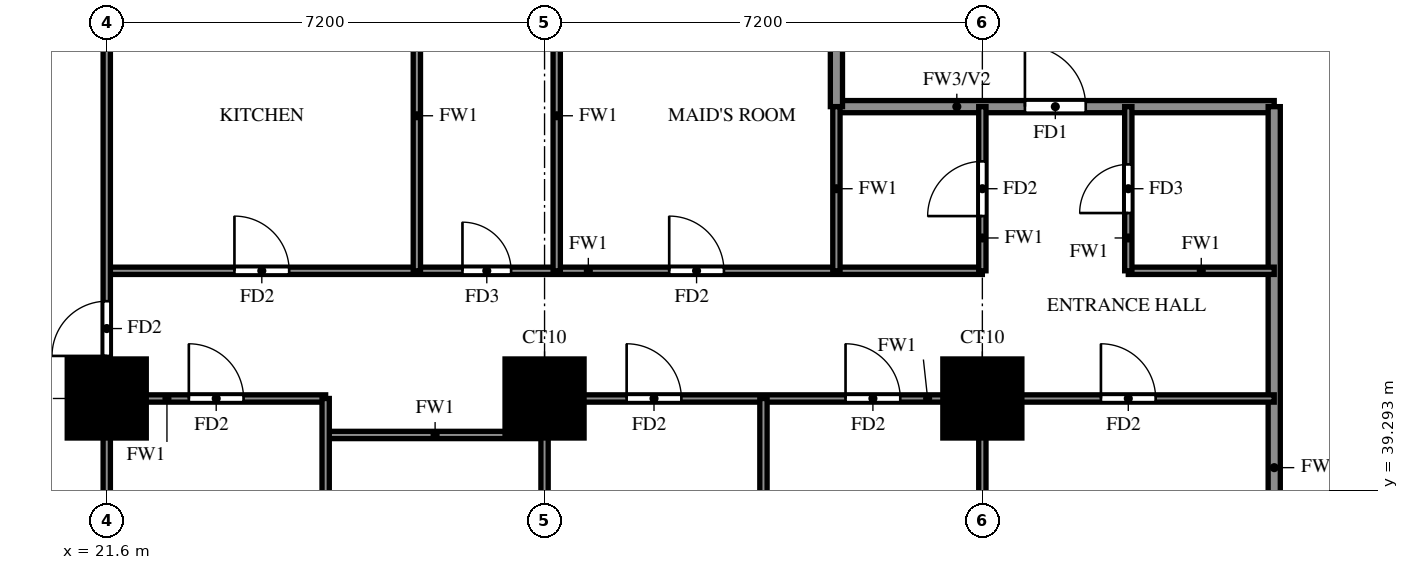
"""IFC4 building model, lengths in metres.
Left out: names, types, materials, properties, quantities, classifications, styles, units other than length and angle.
Written with IfcOpenShell. Run it as: python <this file> out.ifc"""

import sys

from ifc_helpers import new_model, si_unit, direction, frame, frame_2d, origin, origin_2d, place, context, subcontext, project, spatial, rectangle, extrude, source, transform, mapped, element, fill, save


model = new_model("IFC4")
c1 = context("Model", 3, precision=1e-05, world=origin(), true_north=direction((0.0, 1.0)))
c2 = subcontext(c1, "Body", "Model", "MODEL_VIEW")
j1 = project(units=[si_unit("LENGTHUNIT", "METRE"), si_unit("PLANEANGLEUNIT", "RADIAN")], contexts=[c1])
p1 = place(None, origin())
s1 = spatial("IfcSite", under=j1, at=p1, CompositionType="ELEMENT")
p2 = place(p1, origin())
s2 = spatial("IfcBuilding", under=s1, at=p2, CompositionType="ELEMENT")
p3 = place(p2, frame((0.0, 0.0, 90.0)))
s3 = spatial("IfcBuildingStorey", under=s2, at=p3, CompositionType="ELEMENT", Elevation=90.0)
m1 = source(origin(), c2, "Body", "SweptSolid", [
    extrude(rectangle(XDim=1.3, YDim=1.3, at=origin_2d()), origin(), (0.0, 0.0, 1.0), 3.18),
])
for number, where, z_axis, x_axis in (
    (1, (21.6, 40.8, 0.0), (0.0, 0.0, 1.0), (1.0, 0.0, 0.0)),
    (2, (28.8, 40.8, 0.0), (0.0, 0.0, 1.0), (1.0, 0.0, 0.0)),
    (3, (36.0, 40.8, 0.0), (0.0, 0.0, 1.0), (1.0, 0.0, 0.0)),
):
    element("IfcColumn", number, at=place(p3, frame(where, z_axis=z_axis, x_axis=x_axis)), inside=s3, PredefinedType="COLUMN", context=c2, shape_type="MappedRepresentation", body=[
        mapped(m1, transform((0.0, 0.0, 0.0))),
    ])
p4 = place(p3, frame((33.6, 45.6, 0.0), z_axis=(0.0, 0.0, 1.0), x_axis=(1.0, 0.0, 0.0)))
e4 = element("IfcWall", 4, at=p4, inside=s3, PredefinedType="SOLIDWALL", context=c2, shape_type="SweptSolid", body=[
    extrude(rectangle(XDim=7.2, YDim=0.2, at=frame_2d((3.6, 0.0))), origin(), (0.0, 0.0, 1.0), 3.18),
])
p5 = place(p4, frame((3.1, 0.0, 0.0)))
e5 = element("IfcOpeningElement", 5, at=p5, cuts=e4, PredefinedType="OPENING", context=c2, shape_type="SweptSolid", body=[
    extrude(rectangle(XDim=1.0, YDim=2.1, at=frame_2d((0.5, 1.05))), frame((0.0, 0.11, 0.0), z_axis=(0.0, -1.0, 0.0), x_axis=(1.0, 0.0, 0.0)), (0.0, 0.0, 1.0), 0.22),
])
p6 = place(p3, frame((33.6, 45.6, 0.0), z_axis=(0.0, 0.0, 1.0), x_axis=(0.0, 1.0, 0.0)))
e6 = element("IfcWall", 6, at=p6, inside=s3, PredefinedType="SOLIDWALL", context=c2, shape_type="SweptSolid", body=[
    extrude(rectangle(XDim=12.0, YDim=0.2, at=frame_2d((6.0, 0.0))), origin(), (0.0, 0.0, 1.0), 3.18),
])
p7 = place(p3, frame((40.8, 33.725, 0.0), z_axis=(0.0, 0.0, 1.0), x_axis=(0.0, 1.0, 0.0)))
e7 = element("IfcWall", 7, at=p7, inside=s3, PredefinedType="SOLIDWALL", context=c2, shape_type="SweptSolid", body=[
    extrude(rectangle(XDim=11.875, YDim=0.2, at=frame_2d((5.938, 0.0))), origin(), (0.0, 0.0, 1.0), 2.28),
])
p8 = place(p3, frame((25.2, 40.2, 0.0), z_axis=(0.0, 0.0, 1.0), x_axis=(1.0, 0.0, 0.0)))
e8 = element("IfcWall", 8, at=p8, inside=s3, PredefinedType="PARTITIONING", context=c2, shape_type="SweptSolid", body=[
    extrude(rectangle(XDim=3.6, YDim=0.12, at=frame_2d((1.8, 0.0))), origin(), (0.0, 0.0, 1.0), 3.18),
])
p9 = place(p3, frame((21.6, 40.8, 0.0), z_axis=(0.0, 0.0, 1.0), x_axis=(1.0, 0.0, 0.0)))
e9 = element("IfcWall", 9, at=p9, inside=s3, PredefinedType="PARTITIONING", context=c2, shape_type="SweptSolid", body=[
    extrude(rectangle(XDim=3.6, YDim=0.12, at=frame_2d((1.8, 0.0))), origin(), (0.0, 0.0, 1.0), 3.18),
])
p10 = place(p9, frame((1.35, 0.0, 0.0)))
e10 = element("IfcOpeningElement", 10, at=p10, cuts=e9, PredefinedType="OPENING", context=c2, shape_type="SweptSolid", body=[
    extrude(rectangle(XDim=0.9, YDim=2.1, at=frame_2d((0.45, 1.05))), frame((0.0, 0.07, 0.0), z_axis=(0.0, -1.0, 0.0), x_axis=(1.0, 0.0, 0.0)), (0.0, 0.0, 1.0), 0.14),
])
p11 = place(p3, frame((28.8, 40.8, 0.0), z_axis=(0.0, 0.0, 1.0), x_axis=(1.0, 0.0, 0.0)))
e11 = element("IfcWall", 11, at=p11, inside=s3, PredefinedType="PARTITIONING", context=c2, shape_type="SweptSolid", body=[
    extrude(rectangle(XDim=12.0, YDim=0.12, at=frame_2d((6.0, 0.0))), origin(), (0.0, 0.0, 1.0), 3.18),
])
p12 = place(p11, frame((1.35, 0.0, 0.0)))
e12 = element("IfcOpeningElement", 12, at=p12, cuts=e11, PredefinedType="OPENING", context=c2, shape_type="SweptSolid", body=[
    extrude(rectangle(XDim=0.9, YDim=2.1, at=frame_2d((0.45, 1.05))), frame((0.0, 0.07, 0.0), z_axis=(0.0, -1.0, 0.0), x_axis=(1.0, 0.0, 0.0)), (0.0, 0.0, 1.0), 0.14),
])
p13 = place(p11, frame((4.95, 0.0, 0.0)))
e13 = element("IfcOpeningElement", 13, at=p13, cuts=e11, PredefinedType="OPENING", context=c2, shape_type="SweptSolid", body=[
    extrude(rectangle(XDim=0.9, YDim=2.1, at=frame_2d((0.45, 1.05))), frame((0.0, 0.07, 0.0), z_axis=(0.0, -1.0, 0.0), x_axis=(1.0, 0.0, 0.0)), (0.0, 0.0, 1.0), 0.14),
])
p14 = place(p11, frame((9.15, 0.0, 0.0)))
e14 = element("IfcOpeningElement", 14, at=p14, cuts=e11, PredefinedType="OPENING", context=c2, shape_type="SweptSolid", body=[
    extrude(rectangle(XDim=0.9, YDim=2.1, at=frame_2d((0.45, 1.05))), frame((0.0, 0.07, 0.0), z_axis=(0.0, -1.0, 0.0), x_axis=(1.0, 0.0, 0.0)), (0.0, 0.0, 1.0), 0.14),
])
p15 = place(p3, frame((21.6, 42.9, 0.0), z_axis=(0.0, 0.0, 1.0), x_axis=(1.0, 0.0, 0.0)))
e15 = element("IfcWall", 15, at=p15, inside=s3, PredefinedType="PARTITIONING", context=c2, shape_type="SweptSolid", body=[
    extrude(rectangle(XDim=14.4, YDim=0.12, at=frame_2d((7.2, 0.0))), origin(), (0.0, 0.0, 1.0), 3.18),
])
p16 = place(p15, frame((2.1, 0.0, 0.0)))
e16 = element("IfcOpeningElement", 16, at=p16, cuts=e15, PredefinedType="OPENING", context=c2, shape_type="SweptSolid", body=[
    extrude(rectangle(XDim=0.9, YDim=2.1, at=frame_2d((0.45, 1.05))), frame((0.0, 0.07, 0.0), z_axis=(0.0, -1.0, 0.0), x_axis=(1.0, 0.0, 0.0)), (0.0, 0.0, 1.0), 0.14),
])
p17 = place(p15, frame((5.85, 0.0, 0.0)))
e17 = element("IfcOpeningElement", 17, at=p17, cuts=e15, PredefinedType="OPENING", context=c2, shape_type="SweptSolid", body=[
    extrude(rectangle(XDim=0.8, YDim=2.1, at=frame_2d((0.4, 1.05))), frame((0.0, 0.07, 0.0), z_axis=(0.0, -1.0, 0.0), x_axis=(1.0, 0.0, 0.0)), (0.0, 0.0, 1.0), 0.14),
])
p18 = place(p15, frame((9.25, 0.0, 0.0)))
e18 = element("IfcOpeningElement", 18, at=p18, cuts=e15, PredefinedType="OPENING", context=c2, shape_type="SweptSolid", body=[
    extrude(rectangle(XDim=0.9, YDim=2.1, at=frame_2d((0.45, 1.05))), frame((0.0, 0.07, 0.0), z_axis=(0.0, -1.0, 0.0), x_axis=(1.0, 0.0, 0.0)), (0.0, 0.0, 1.0), 0.14),
])
p19 = place(p3, frame((38.4, 42.9, 0.0), z_axis=(0.0, 0.0, 1.0), x_axis=(1.0, 0.0, 0.0)))
e19 = element("IfcWall", 19, at=p19, inside=s3, PredefinedType="PARTITIONING", context=c2, shape_type="SweptSolid", body=[
    extrude(rectangle(XDim=2.4, YDim=0.12, at=frame_2d((1.2, 0.0))), origin(), (0.0, 0.0, 1.0), 3.18),
])
p20 = place(p3, frame((21.6, 33.725, 0.0), z_axis=(0.0, 0.0, 1.0), x_axis=(0.0, 1.0, 0.0)))
e20 = element("IfcWall", 20, at=p20, inside=s3, PredefinedType="PARTITIONING", context=c2, shape_type="SweptSolid", body=[
    extrude(rectangle(XDim=32.275, YDim=0.12, at=frame_2d((16.137, 0.0))), origin(), (0.0, 0.0, 1.0), 3.18),
])
p21 = place(p20, frame((7.775, 0.0, 0.0)))
e21 = element("IfcOpeningElement", 21, at=p21, cuts=e20, PredefinedType="OPENING", context=c2, shape_type="SweptSolid", body=[
    extrude(rectangle(XDim=0.9, YDim=2.1, at=frame_2d((0.45, 1.05))), frame((0.0, 0.07, 0.0), z_axis=(0.0, -1.0, 0.0), x_axis=(1.0, 0.0, 0.0)), (0.0, 0.0, 1.0), 0.14),
])
p22 = place(p20, frame((15.625, 0.0, 0.0)))
e22 = element("IfcOpeningElement", 22, at=p22, cuts=e20, PredefinedType="OPENING", context=c2, shape_type="SweptSolid", body=[
    extrude(rectangle(XDim=0.9, YDim=2.1, at=frame_2d((0.45, 1.05))), frame((0.0, 0.07, 0.0), z_axis=(0.0, -1.0, 0.0), x_axis=(1.0, 0.0, 0.0)), (0.0, 0.0, 1.0), 0.14),
])
p23 = place(p20, frame((22.225, 0.0, 0.0)))
e23 = element("IfcOpeningElement", 23, at=p23, cuts=e20, PredefinedType="OPENING", context=c2, shape_type="SweptSolid", body=[
    extrude(rectangle(XDim=1.5, YDim=2.1, at=frame_2d((0.75, 1.05))), frame((0.0, 0.07, 0.0), z_axis=(0.0, -1.0, 0.0), x_axis=(1.0, 0.0, 0.0)), (0.0, 0.0, 1.0), 0.14),
])
p24 = place(p20, frame((26.425, 0.0, 0.0)))
e24 = element("IfcOpeningElement", 24, at=p24, cuts=e20, PredefinedType="OPENING", context=c2, shape_type="SweptSolid", body=[
    extrude(rectangle(XDim=0.9, YDim=2.1, at=frame_2d((0.45, 1.05))), frame((0.0, 0.07, 0.0), z_axis=(0.0, -1.0, 0.0), x_axis=(1.0, 0.0, 0.0)), (0.0, 0.0, 1.0), 0.14),
])
p25 = place(p20, frame((30.025, 0.0, 0.0)))
e25 = element("IfcOpeningElement", 25, at=p25, cuts=e20, PredefinedType="OPENING", context=c2, shape_type="SweptSolid", body=[
    extrude(rectangle(XDim=0.9, YDim=2.1, at=frame_2d((0.45, 1.05))), frame((0.0, 0.07, 0.0), z_axis=(0.0, -1.0, 0.0), x_axis=(1.0, 0.0, 0.0)), (0.0, 0.0, 1.0), 0.14),
])
p26 = place(p3, frame((25.2, 33.725, 0.0), z_axis=(0.0, 0.0, 1.0), x_axis=(0.0, 1.0, 0.0)))
e26 = element("IfcWall", 26, at=p26, inside=s3, PredefinedType="PARTITIONING", context=c2, shape_type="SweptSolid", body=[
    extrude(rectangle(XDim=7.075, YDim=0.12, at=frame_2d((3.538, 0.0))), origin(), (0.0, 0.0, 1.0), 2.28),
])
p27 = place(p26, frame((2.837, 0.0, 0.0)))
e27 = element("IfcOpeningElement", 27, at=p27, cuts=e26, PredefinedType="OPENING", context=c2, shape_type="SweptSolid", body=[
    extrude(rectangle(XDim=0.8, YDim=2.1, at=frame_2d((0.4, 1.05))), frame((0.0, 0.07, 0.0), z_axis=(0.0, -1.0, 0.0), x_axis=(1.0, 0.0, 0.0)), (0.0, 0.0, 1.0), 0.14),
])
p28 = place(p3, frame((26.7, 42.9, 0.0), z_axis=(0.0, 0.0, 1.0), x_axis=(0.0, 1.0, 0.0)))
e28 = element("IfcWall", 28, at=p28, inside=s3, PredefinedType="PARTITIONING", context=c2, shape_type="SweptSolid", body=[
    extrude(rectangle(XDim=5.1, YDim=0.12, at=frame_2d((2.55, 0.0))), origin(), (0.0, 0.0, 1.0), 3.18),
])
p29 = place(p3, frame((28.8, 33.725, 0.0), z_axis=(0.0, 0.0, 1.0), x_axis=(0.0, 1.0, 0.0)))
e29 = element("IfcWall", 29, at=p29, inside=s3, PredefinedType="PARTITIONING", context=c2, shape_type="SweptSolid", body=[
    extrude(rectangle(XDim=7.075, YDim=0.12, at=frame_2d((3.538, 0.0))), origin(), (0.0, 0.0, 1.0), 3.18),
])
p30 = place(p3, frame((29.0, 42.9, 0.0), z_axis=(0.0, 0.0, 1.0), x_axis=(0.0, 1.0, 0.0)))
e30 = element("IfcWall", 30, at=p30, inside=s3, PredefinedType="PARTITIONING", context=c2, shape_type="SweptSolid", body=[
    extrude(rectangle(XDim=5.1, YDim=0.12, at=frame_2d((2.55, 0.0))), origin(), (0.0, 0.0, 1.0), 3.18),
])
p31 = place(p3, frame((32.4, 33.725, 0.0), z_axis=(0.0, 0.0, 1.0), x_axis=(0.0, 1.0, 0.0)))
e31 = element("IfcWall", 31, at=p31, inside=s3, PredefinedType="PARTITIONING", context=c2, shape_type="SweptSolid", body=[
    extrude(rectangle(XDim=7.075, YDim=0.12, at=frame_2d((3.538, 0.0))), origin(), (0.0, 0.0, 1.0), 2.28),
])
p32 = place(p3, frame((33.6, 42.9, 0.0), z_axis=(0.0, 0.0, 1.0), x_axis=(0.0, 1.0, 0.0)))
e32 = element("IfcWall", 32, at=p32, inside=s3, PredefinedType="PARTITIONING", context=c2, shape_type="SweptSolid", body=[
    extrude(rectangle(XDim=2.7, YDim=0.12, at=frame_2d((1.35, 0.0))), origin(), (0.0, 0.0, 1.0), 3.18),
])
p33 = place(p3, frame((36.0, 33.725, 0.0), z_axis=(0.0, 0.0, 1.0), x_axis=(0.0, 1.0, 0.0)))
e33 = element("IfcWall", 33, at=p33, inside=s3, PredefinedType="PARTITIONING", context=c2, shape_type="SweptSolid", body=[
    extrude(rectangle(XDim=7.075, YDim=0.12, at=frame_2d((3.538, 0.0))), origin(), (0.0, 0.0, 1.0), 3.18),
])
p34 = place(p3, frame((36.0, 42.9, 0.0), z_axis=(0.0, 0.0, 1.0), x_axis=(0.0, 1.0, 0.0)))
e34 = element("IfcWall", 34, at=p34, inside=s3, PredefinedType="PARTITIONING", context=c2, shape_type="SweptSolid", body=[
    extrude(rectangle(XDim=2.7, YDim=0.12, at=frame_2d((1.35, 0.0))), origin(), (0.0, 0.0, 1.0), 3.18),
])
p35 = place(p34, frame((0.9, 0.0, 0.0)))
e35 = element("IfcOpeningElement", 35, at=p35, cuts=e34, PredefinedType="OPENING", context=c2, shape_type="SweptSolid", body=[
    extrude(rectangle(XDim=0.9, YDim=2.1, at=frame_2d((0.45, 1.05))), frame((0.0, 0.07, 0.0), z_axis=(0.0, -1.0, 0.0), x_axis=(1.0, 0.0, 0.0)), (0.0, 0.0, 1.0), 0.14),
])
p36 = place(p3, frame((38.4, 42.9, 0.0), z_axis=(0.0, 0.0, 1.0), x_axis=(0.0, 1.0, 0.0)))
e36 = element("IfcWall", 36, at=p36, inside=s3, PredefinedType="PARTITIONING", context=c2, shape_type="SweptSolid", body=[
    extrude(rectangle(XDim=2.7, YDim=0.12, at=frame_2d((1.35, 0.0))), origin(), (0.0, 0.0, 1.0), 3.18),
])
p37 = place(p36, frame((0.95, 0.0, 0.0)))
e37 = element("IfcOpeningElement", 37, at=p37, cuts=e36, PredefinedType="OPENING", context=c2, shape_type="SweptSolid", body=[
    extrude(rectangle(XDim=0.8, YDim=2.1, at=frame_2d((0.4, 1.05))), frame((0.0, 0.07, 0.0), z_axis=(0.0, -1.0, 0.0), x_axis=(1.0, 0.0, 0.0)), (0.0, 0.0, 1.0), 0.14),
])
p38 = place(p5, origin())
e38 = element("IfcDoor", 38, at=p38, inside=s3, OperationType="SINGLE_SWING_LEFT", PredefinedType="DOOR", context=c2, shape_type="SweptSolid", body=[
    extrude(rectangle(XDim=1.0, YDim=2.1, at=frame_2d((0.5, 1.05))), frame((0.0, 0.025, 0.0), z_axis=(0.0, -1.0, 0.0), x_axis=(1.0, 0.0, 0.0)), (0.0, 0.0, 1.0), 0.05),
])
fill(e5, e38)
p39 = place(p21, origin())
e39 = element("IfcDoor", 39, at=p39, inside=s3, OperationType="SINGLE_SWING_LEFT", PredefinedType="DOOR", context=c2, shape_type="SweptSolid", body=[
    extrude(rectangle(XDim=0.9, YDim=2.1, at=frame_2d((0.45, 1.05))), frame((0.0, 0.025, 0.0), z_axis=(0.0, -1.0, 0.0), x_axis=(1.0, 0.0, 0.0)), (0.0, 0.0, 1.0), 0.05),
])
fill(e21, e39)
p40 = place(p10, origin())
e40 = element("IfcDoor", 40, at=p40, inside=s3, OperationType="SINGLE_SWING_LEFT", PredefinedType="DOOR", context=c2, shape_type="SweptSolid", body=[
    extrude(rectangle(XDim=0.9, YDim=2.1, at=frame_2d((0.45, 1.05))), frame((0.0, 0.025, 0.0), z_axis=(0.0, -1.0, 0.0), x_axis=(1.0, 0.0, 0.0)), (0.0, 0.0, 1.0), 0.05),
])
fill(e10, e40)
p41 = place(p12, origin())
e41 = element("IfcDoor", 41, at=p41, inside=s3, OperationType="SINGLE_SWING_RIGHT", PredefinedType="DOOR", context=c2, shape_type="SweptSolid", body=[
    extrude(rectangle(XDim=0.9, YDim=2.1, at=frame_2d((0.45, 1.05))), frame((0.0, 0.025, 0.0), z_axis=(0.0, -1.0, 0.0), x_axis=(1.0, 0.0, 0.0)), (0.0, 0.0, 1.0), 0.05),
])
fill(e12, e41)
p42 = place(p13, origin())
e42 = element("IfcDoor", 42, at=p42, inside=s3, OperationType="SINGLE_SWING_LEFT", PredefinedType="DOOR", context=c2, shape_type="SweptSolid", body=[
    extrude(rectangle(XDim=0.9, YDim=2.1, at=frame_2d((0.45, 1.05))), frame((0.0, 0.025, 0.0), z_axis=(0.0, -1.0, 0.0), x_axis=(1.0, 0.0, 0.0)), (0.0, 0.0, 1.0), 0.05),
])
fill(e13, e42)
p43 = place(p14, origin())
e43 = element("IfcDoor", 43, at=p43, inside=s3, OperationType="SINGLE_SWING_LEFT", PredefinedType="DOOR", context=c2, shape_type="SweptSolid", body=[
    extrude(rectangle(XDim=0.9, YDim=2.1, at=frame_2d((0.45, 1.05))), frame((0.0, 0.025, 0.0), z_axis=(0.0, -1.0, 0.0), x_axis=(1.0, 0.0, 0.0)), (0.0, 0.0, 1.0), 0.05),
])
fill(e14, e43)
p44 = place(p16, origin())
e44 = element("IfcDoor", 44, at=p44, inside=s3, OperationType="SINGLE_SWING_RIGHT", PredefinedType="DOOR", context=c2, shape_type="SweptSolid", body=[
    extrude(rectangle(XDim=0.9, YDim=2.1, at=frame_2d((0.45, 1.05))), frame((0.0, 0.025, 0.0), z_axis=(0.0, -1.0, 0.0), x_axis=(1.0, 0.0, 0.0)), (0.0, 0.0, 1.0), 0.05),
])
fill(e16, e44)
p45 = place(p17, origin())
e45 = element("IfcDoor", 45, at=p45, inside=s3, OperationType="SINGLE_SWING_LEFT", PredefinedType="DOOR", context=c2, shape_type="SweptSolid", body=[
    extrude(rectangle(XDim=0.8, YDim=2.1, at=frame_2d((0.4, 1.05))), frame((0.0, 0.025, 0.0), z_axis=(0.0, -1.0, 0.0), x_axis=(1.0, 0.0, 0.0)), (0.0, 0.0, 1.0), 0.05),
])
fill(e17, e45)
p46 = place(p18, origin())
e46 = element("IfcDoor", 46, at=p46, inside=s3, OperationType="SINGLE_SWING_LEFT", PredefinedType="DOOR", context=c2, shape_type="SweptSolid", body=[
    extrude(rectangle(XDim=0.9, YDim=2.1, at=frame_2d((0.45, 1.05))), frame((0.0, 0.025, 0.0), z_axis=(0.0, -1.0, 0.0), x_axis=(1.0, 0.0, 0.0)), (0.0, 0.0, 1.0), 0.05),
])
fill(e18, e46)
p47 = place(p35, origin())
e47 = element("IfcDoor", 47, at=p47, inside=s3, OperationType="SINGLE_SWING_RIGHT", PredefinedType="DOOR", context=c2, shape_type="SweptSolid", body=[
    extrude(rectangle(XDim=0.9, YDim=2.1, at=frame_2d((0.45, 1.05))), frame((0.0, 0.025, 0.0), z_axis=(0.0, -1.0, 0.0), x_axis=(1.0, 0.0, 0.0)), (0.0, 0.0, 1.0), 0.05),
])
fill(e35, e47)
p48 = place(p37, origin())
e48 = element("IfcDoor", 48, at=p48, inside=s3, OperationType="SINGLE_SWING_LEFT", PredefinedType="DOOR", context=c2, shape_type="SweptSolid", body=[
    extrude(rectangle(XDim=0.8, YDim=2.1, at=frame_2d((0.4, 1.05))), frame((0.0, 0.025, 0.0), z_axis=(0.0, -1.0, 0.0), x_axis=(1.0, 0.0, 0.0)), (0.0, 0.0, 1.0), 0.05),
])
fill(e37, e48)
save(model, sys.argv[1])
